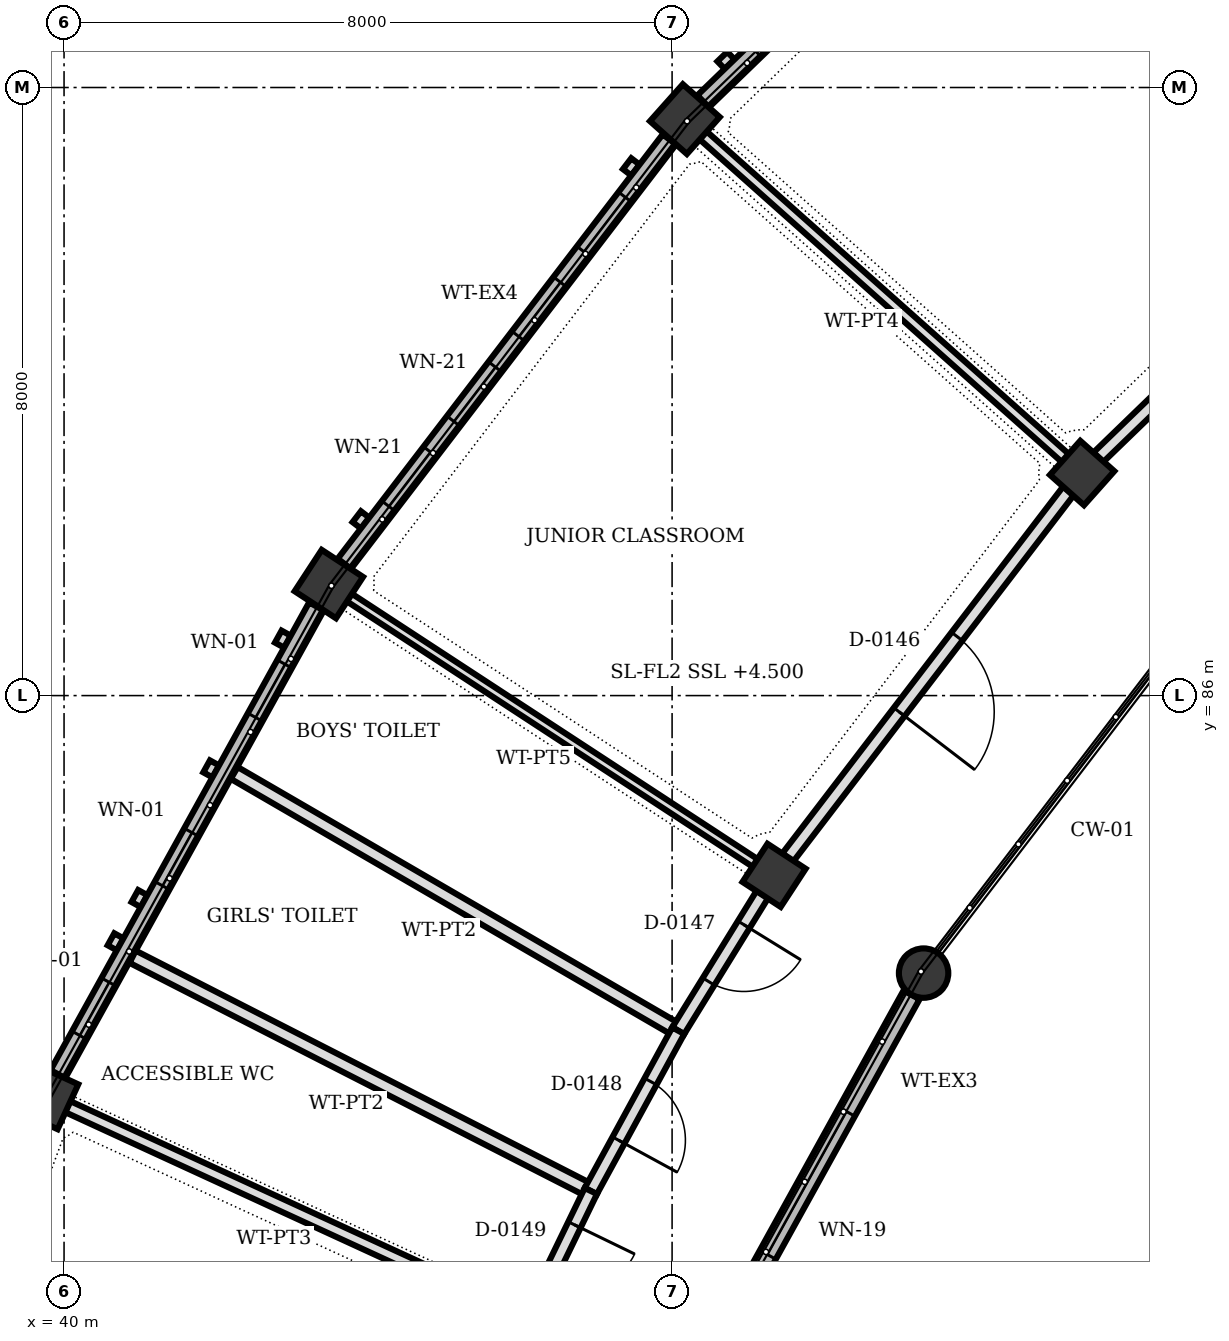
"""IFC4 building model, lengths in metres.
Left out: names, types, materials, properties, quantities, classifications, styles, units other than length and angle.
Written with IfcOpenShell. Run it as: python <this file> out.ifc"""

import sys

from ifc_helpers import new_model, si_unit, direction, frame, frame_2d, origin, origin_2d, place, context, subcontext, project, spatial, rectangle, circle, extrude, element, fill, save


model = new_model("IFC4")
c1 = context("Model", 3, precision=1e-05, world=origin(), true_north=direction((0.0, 1.0)))
c2 = subcontext(c1, "Body", "Model", "MODEL_VIEW")
j1 = project(units=[si_unit("LENGTHUNIT", "METRE"), si_unit("PLANEANGLEUNIT", "RADIAN")], contexts=[c1])
p1 = place(None, origin())
s1 = spatial("IfcSite", under=j1, at=p1, CompositionType="ELEMENT")
p2 = place(p1, origin())
s2 = spatial("IfcBuilding", under=s1, at=p2, CompositionType="ELEMENT")
p3 = place(p2, frame((0.0, 0.0, 4.5)))
s3 = spatial("IfcBuildingStorey", under=s2, at=p3, CompositionType="ELEMENT", Elevation=4.5)
p4 = place(p3, frame((51.309, 82.349, 0.0), z_axis=(0.0, 0.0, 1.0), x_axis=(1.0, 0.0, 0.0)))
e1 = element("IfcColumn", 1, at=p4, inside=s3, PredefinedType="COLUMN", context=c2, shape_type="SweptSolid", body=[
    extrude(circle(Radius=0.325, at=origin_2d()), origin(), (0.0, 0.0, 1.0), 5.12),
])
for number, where, z_axis, x_axis in (
    (2, (53.395, 88.928, 0.0), (0.0, 0.0, 1.0), (-0.747, 0.665, 0.0)),
    (3, (49.342, 83.635, 0.0), (0.0, 0.0, 1.0), (-0.837, 0.547, 0.0)),
):
    element("IfcColumn", number, at=place(p3, frame(where, z_axis=z_axis, x_axis=x_axis)), inside=s3, PredefinedType="COLUMN", context=c2, shape_type="SweptSolid", body=[
        extrude(rectangle(XDim=0.6, YDim=0.6, at=origin_2d()), origin(), (0.0, 0.0, 1.0), 4.0),
    ])
for number, where, z_axis, x_axis in (
    (4, (48.168, 93.584, 0.0), (0.0, 0.0, 1.0), (-0.747, 0.665, 0.0)),
    (5, (43.484, 87.467, 0.0), (0.0, 0.0, 1.0), (-0.837, 0.547, 0.0)),
    (6, (39.756, 80.726, 0.0), (0.0, 0.0, 1.0), (-0.909, 0.418, 0.0)),
):
    element("IfcColumn", number, at=place(p3, frame(where, z_axis=z_axis, x_axis=x_axis)), inside=s3, PredefinedType="COLUMN", context=c2, shape_type="SweptSolid", body=[
        extrude(rectangle(XDim=0.65, YDim=0.65, at=origin_2d()), origin(), (0.0, 0.0, 1.0), 4.0),
    ])
p5 = place(p3, frame((48.409, 93.818, 0.0), z_axis=(0.0, 0.0, 1.0), x_axis=(0.718677705088, 0.695343336927, 0.0)))
e7 = element("IfcWall", 7, at=p5, inside=s3, PredefinedType="SOLIDWALL", context=c2, shape_type="SweptSolid", body=[
    extrude(rectangle(XDim=7.031, YDim=0.22, at=frame_2d((3.516, 0.0))), origin(), (0.0, 0.0, 1.0), 3.172),
])
p6 = place(p5, frame((0.956, 0.0, 0.85)))
e8 = element("IfcOpeningElement", 8, at=p6, cuts=e7, PredefinedType="OPENING", context=c2, shape_type="SweptSolid", body=[
    extrude(rectangle(XDim=0.9, YDim=1.4, at=frame_2d((0.45, 0.7))), frame((0.0, 0.12, 0.0), z_axis=(0.0, -1.0, 0.0), x_axis=(1.0, 0.0, 0.0)), (0.0, 0.0, 1.0), 0.24),
])
p7 = place(p5, frame((2.362, 0.0, 0.85)))
e9 = element("IfcOpeningElement", 9, at=p7, cuts=e7, PredefinedType="OPENING", context=c2, shape_type="SweptSolid", body=[
    extrude(rectangle(XDim=0.9, YDim=1.4, at=frame_2d((0.45, 0.7))), frame((0.0, 0.12, 0.0), z_axis=(0.0, -1.0, 0.0), x_axis=(1.0, 0.0, 0.0)), (0.0, 0.0, 1.0), 0.24),
])
p8 = place(p5, frame((3.769, 0.0, 0.85)))
e10 = element("IfcOpeningElement", 10, at=p8, cuts=e7, PredefinedType="OPENING", context=c2, shape_type="SweptSolid", body=[
    extrude(rectangle(XDim=0.9, YDim=1.4, at=frame_2d((0.45, 0.7))), frame((0.0, 0.12, 0.0), z_axis=(0.0, -1.0, 0.0), x_axis=(1.0, 0.0, 0.0)), (0.0, 0.0, 1.0), 0.24),
])
p9 = place(p5, frame((5.175, 0.0, 0.85)))
e11 = element("IfcOpeningElement", 11, at=p9, cuts=e7, PredefinedType="OPENING", context=c2, shape_type="SweptSolid", body=[
    extrude(rectangle(XDim=0.9, YDim=1.4, at=frame_2d((0.45, 0.7))), frame((0.0, 0.12, 0.0), z_axis=(0.0, -1.0, 0.0), x_axis=(1.0, 0.0, 0.0)), (0.0, 0.0, 1.0), 0.24),
])
p10 = place(p3, frame((43.688, 87.734, 0.0), z_axis=(0.0, 0.0, 1.0), x_axis=(0.60805685998, 0.793893478391, 0.0)))
e12 = element("IfcWall", 12, at=p10, inside=s3, PredefinedType="SOLIDWALL", context=c2, shape_type="SweptSolid", body=[
    extrude(rectangle(XDim=7.032, YDim=0.22, at=frame_2d((3.516, 0.0))), origin(), (0.0, 0.0, 1.0), 3.172),
])
p11 = place(p10, frame((0.956, 0.0, 0.85)))
e13 = element("IfcOpeningElement", 13, at=p11, cuts=e12, PredefinedType="OPENING", context=c2, shape_type="SweptSolid", body=[
    extrude(rectangle(XDim=0.9, YDim=1.4, at=frame_2d((0.45, 0.7))), frame((0.0, 0.12, 0.0), z_axis=(0.0, -1.0, 0.0), x_axis=(1.0, 0.0, 0.0)), (0.0, 0.0, 1.0), 0.24),
])
p12 = place(p10, frame((2.363, 0.0, 0.85)))
e14 = element("IfcOpeningElement", 14, at=p12, cuts=e12, PredefinedType="OPENING", context=c2, shape_type="SweptSolid", body=[
    extrude(rectangle(XDim=0.9, YDim=1.4, at=frame_2d((0.45, 0.7))), frame((0.0, 0.12, 0.0), z_axis=(0.0, -1.0, 0.0), x_axis=(1.0, 0.0, 0.0)), (0.0, 0.0, 1.0), 0.24),
])
p13 = place(p10, frame((3.769, 0.0, 0.85)))
e15 = element("IfcOpeningElement", 15, at=p13, cuts=e12, PredefinedType="OPENING", context=c2, shape_type="SweptSolid", body=[
    extrude(rectangle(XDim=0.9, YDim=1.4, at=frame_2d((0.45, 0.7))), frame((0.0, 0.12, 0.0), z_axis=(0.0, -1.0, 0.0), x_axis=(1.0, 0.0, 0.0)), (0.0, 0.0, 1.0), 0.24),
])
p14 = place(p10, frame((5.176, 0.0, 0.85)))
e16 = element("IfcOpeningElement", 16, at=p14, cuts=e12, PredefinedType="OPENING", context=c2, shape_type="SweptSolid", body=[
    extrude(rectangle(XDim=0.9, YDim=1.4, at=frame_2d((0.45, 0.7))), frame((0.0, 0.12, 0.0), z_axis=(0.0, -1.0, 0.0), x_axis=(1.0, 0.0, 0.0)), (0.0, 0.0, 1.0), 0.24),
])
p15 = place(p3, frame((39.919, 81.02, 0.0), z_axis=(0.0, 0.0, 1.0), x_axis=(0.483873000068, 0.87513822897, 0.0)))
e17 = element("IfcWall", 17, at=p15, inside=s3, PredefinedType="SOLIDWALL", context=c2, shape_type="SweptSolid", body=[
    extrude(rectangle(XDim=7.031, YDim=0.22, at=frame_2d((3.516, 0.0))), origin(), (0.0, 0.0, 1.0), 3.172),
])
p16 = place(p15, frame((0.584, 0.0, 1.15)))
e18 = element("IfcOpeningElement", 18, at=p16, cuts=e17, PredefinedType="OPENING", context=c2, shape_type="SweptSolid", body=[
    extrude(rectangle(XDim=0.8, YDim=1.1, at=frame_2d((0.4, 0.55))), frame((0.0, 0.12, 0.0), z_axis=(0.0, -1.0, 0.0), x_axis=(1.0, 0.0, 0.0)), (0.0, 0.0, 1.0), 0.24),
])
p17 = place(p15, frame((2.834, 0.0, 1.15)))
e19 = element("IfcOpeningElement", 19, at=p17, cuts=e17, PredefinedType="OPENING", context=c2, shape_type="SweptSolid", body=[
    extrude(rectangle(XDim=0.8, YDim=1.1, at=frame_2d((0.4, 0.55))), frame((0.0, 0.12, 0.0), z_axis=(0.0, -1.0, 0.0), x_axis=(1.0, 0.0, 0.0)), (0.0, 0.0, 1.0), 0.24),
])
p18 = place(p15, frame((5.365, 0.0, 1.15)))
e20 = element("IfcOpeningElement", 20, at=p18, cuts=e17, PredefinedType="OPENING", context=c2, shape_type="SweptSolid", body=[
    extrude(rectangle(XDim=0.8, YDim=1.1, at=frame_2d((0.4, 0.55))), frame((0.0, 0.12, 0.0), z_axis=(0.0, -1.0, 0.0), x_axis=(1.0, 0.0, 0.0)), (0.0, 0.0, 1.0), 0.24),
])
p19 = place(p3, frame((51.151, 82.063, 0.0), z_axis=(0.0, 0.0, 1.0), x_axis=(-0.483955379171, -0.875092675647, 0.0)))
e21 = element("IfcWall", 21, at=p19, inside=s3, PredefinedType="SOLIDWALL", context=c2, shape_type="SweptSolid", body=[
    extrude(rectangle(XDim=5.666, YDim=0.24, at=frame_2d((2.833, 0.0))), origin(), (0.0, 0.0, 1.0), 3.55),
])
p20 = place(p19, frame((1.758, 0.0, 0.9)))
e22 = element("IfcOpeningElement", 22, at=p20, cuts=e21, PredefinedType="OPENING", context=c2, shape_type="SweptSolid", body=[
    extrude(rectangle(XDim=2.15, YDim=1.25, at=frame_2d((1.075, 0.625))), frame((0.0, 0.13, 0.0), z_axis=(0.0, -1.0, 0.0), x_axis=(1.0, 0.0, 0.0)), (0.0, 0.0, 1.0), 0.26),
])
p21 = place(p3, frame((53.177, 89.122, 0.0), z_axis=(0.0, 0.0, 1.0), x_axis=(-0.746692270919, 0.665169641934, 0.0)))
e23 = element("IfcWall", 23, at=p21, inside=s3, PredefinedType="PARTITIONING", context=c2, shape_type="SweptSolid", body=[
    extrude(rectangle(XDim=6.391, YDim=0.14, at=frame_2d((3.195, 0.0))), origin(), (0.0, 0.0, 1.0), 3.072),
])
p22 = place(p3, frame((49.098, 83.795, 0.0), z_axis=(0.0, 0.0, 1.0), x_axis=(-0.836919139192, 0.547326551935, 0.0)))
e24 = element("IfcWall", 24, at=p22, inside=s3, PredefinedType="PARTITIONING", context=c2, shape_type="SweptSolid", body=[
    extrude(rectangle(XDim=6.391, YDim=0.12, at=frame_2d((3.196, 0.0))), origin(), (0.0, 0.0, 1.0), 3.072),
])
p23 = place(p3, frame((45.851, 77.923, 0.0), z_axis=(0.0, 0.0, 1.0), x_axis=(-0.908513073448, 0.41785642914, 0.0)))
e25 = element("IfcWall", 25, at=p23, inside=s3, PredefinedType="PARTITIONING", context=c2, shape_type="SweptSolid", body=[
    extrude(rectangle(XDim=6.392, YDim=0.16, at=frame_2d((3.196, 0.0))), origin(), (0.0, 0.0, 1.0), 3.072),
])
p24 = place(p3, frame((48.081, 81.591, 0.0), z_axis=(0.0, 0.0, 1.0), x_axis=(-0.864871459639, 0.501993384719, 0.0)))
e26 = element("IfcWall", 26, at=p24, inside=s3, PredefinedType="PARTITIONING", context=c2, shape_type="SweptSolid", body=[
    extrude(rectangle(XDim=6.755, YDim=0.18, at=frame_2d((3.377, 0.0))), origin(), (0.0, 0.0, 1.0), 3.072),
])
p25 = place(p3, frame((46.931, 79.482, 0.0), z_axis=(0.0, 0.0, 1.0), x_axis=(-0.890396362977, 0.455186024387, 0.0)))
e27 = element("IfcWall", 27, at=p25, inside=s3, PredefinedType="PARTITIONING", context=c2, shape_type="SweptSolid", body=[
    extrude(rectangle(XDim=6.771, YDim=0.18, at=frame_2d((3.385, 0.0))), origin(), (0.0, 0.0, 1.0), 3.072),
])
p26 = place(p3, frame((57.975, 93.361, 0.0), z_axis=(0.0, 0.0, 1.0), x_axis=(-0.7186137907, -0.695409390084, 0.0)))
e28 = element("IfcWall", 28, at=p26, inside=s3, PredefinedType="PARTITIONING", context=c2, shape_type="SweptSolid", body=[
    extrude(rectangle(XDim=6.081, YDim=0.18, at=frame_2d((3.041, 0.0))), origin(), (0.0, 0.0, 1.0), 3.072),
])
p27 = place(p26, frame((2.551, 0.0, 0.0)))
e29 = element("IfcOpeningElement", 29, at=p27, cuts=e28, PredefinedType="OPENING", context=c2, shape_type="SweptSolid", body=[
    extrude(rectangle(XDim=0.98, YDim=2.2, at=frame_2d((0.49, 1.1))), frame((0.0, 0.1, 0.0), z_axis=(0.0, -1.0, 0.0), x_axis=(1.0, 0.0, 0.0)), (0.0, 0.0, 1.0), 0.2),
])
p28 = place(p3, frame((53.217, 88.696, 0.0), z_axis=(0.0, 0.0, 1.0), x_axis=(-0.607883612756, -0.794026141473, 0.0)))
e30 = element("IfcWall", 30, at=p28, inside=s3, PredefinedType="PARTITIONING", context=c2, shape_type="SweptSolid", body=[
    extrude(rectangle(XDim=6.082, YDim=0.18, at=frame_2d((3.041, 0.0))), origin(), (0.0, 0.0, 1.0), 3.072),
])
p29 = place(p28, frame((2.416, 0.0, 0.0)))
e31 = element("IfcOpeningElement", 31, at=p29, cuts=e30, PredefinedType="OPENING", context=c2, shape_type="SweptSolid", body=[
    extrude(rectangle(XDim=1.25, YDim=2.2, at=frame_2d((0.625, 1.1))), frame((0.0, 0.1, 0.0), z_axis=(0.0, -1.0, 0.0), x_axis=(1.0, 0.0, 0.0)), (0.0, 0.0, 1.0), 0.2),
])
p30 = place(p3, frame((49.189, 83.386, 0.0), z_axis=(0.0, 0.0, 1.0), x_axis=(-0.525246440568, -0.850950161097, 0.0)))
e32 = element("IfcWall", 32, at=p30, inside=s3, PredefinedType="PARTITIONING", context=c2, shape_type="SweptSolid", body=[
    extrude(rectangle(XDim=2.109, YDim=0.18, at=frame_2d((1.055, 0.0))), origin(), (0.0, 0.0, 1.0), 3.072),
])
p31 = place(p30, frame((0.469, 0.0, 0.0)))
e33 = element("IfcOpeningElement", 33, at=p31, cuts=e32, PredefinedType="OPENING", context=c2, shape_type="SweptSolid", body=[
    extrude(rectangle(XDim=0.88, YDim=2.1, at=frame_2d((0.44, 1.05))), frame((0.0, 0.1, 0.0), z_axis=(0.0, -1.0, 0.0), x_axis=(1.0, 0.0, 0.0)), (0.0, 0.0, 1.0), 0.2),
])
p32 = place(p3, frame((48.081, 81.591, 0.0), z_axis=(0.0, 0.0, 1.0), x_axis=(-0.478759564311, -0.87794605733, 0.0)))
e34 = element("IfcWall", 34, at=p32, inside=s3, PredefinedType="PARTITIONING", context=c2, shape_type="SweptSolid", body=[
    extrude(rectangle(XDim=2.402, YDim=0.18, at=frame_2d((1.201, 0.0))), origin(), (0.0, 0.0, 1.0), 3.072),
])
p33 = place(p32, frame((0.761, 0.0, 0.0)))
e35 = element("IfcOpeningElement", 35, at=p33, cuts=e34, PredefinedType="OPENING", context=c2, shape_type="SweptSolid", body=[
    extrude(rectangle(XDim=0.88, YDim=2.1, at=frame_2d((0.44, 1.05))), frame((0.0, 0.1, 0.0), z_axis=(0.0, -1.0, 0.0), x_axis=(1.0, 0.0, 0.0)), (0.0, 0.0, 1.0), 0.2),
])
p34 = place(p3, frame((46.931, 79.482, 0.0), z_axis=(0.0, 0.0, 1.0), x_axis=(-0.436524333187, -0.899692451083, 0.0)))
e36 = element("IfcWall", 36, at=p34, inside=s3, PredefinedType="PARTITIONING", context=c2, shape_type="SweptSolid", body=[
    extrude(rectangle(XDim=1.576, YDim=0.18, at=frame_2d((0.788, 0.0))), origin(), (0.0, 0.0, 1.0), 3.072),
])
p35 = place(p34, frame((0.494, 0.0, 0.0)))
e37 = element("IfcOpeningElement", 37, at=p35, cuts=e36, PredefinedType="OPENING", context=c2, shape_type="SweptSolid", body=[
    extrude(rectangle(XDim=0.88, YDim=2.1, at=frame_2d((0.44, 1.05))), frame((0.0, 0.1, 0.0), z_axis=(0.0, -1.0, 0.0), x_axis=(1.0, 0.0, 0.0)), (0.0, 0.0, 1.0), 0.2),
])
p36 = place(p11, origin())
e38 = element("IfcWindow", 38, at=p36, inside=s3, PartitioningType="SINGLE_PANEL", PredefinedType="WINDOW", context=c2, shape_type="SweptSolid", body=[
    extrude(rectangle(XDim=0.9, YDim=1.4, at=frame_2d((0.45, 0.7))), frame((0.0, 0.03, 0.0), z_axis=(0.0, -1.0, 0.0), x_axis=(1.0, 0.0, 0.0)), (0.0, 0.0, 1.0), 0.06),
])
fill(e13, e38)
p37 = place(p12, origin())
e39 = element("IfcWindow", 39, at=p37, inside=s3, PartitioningType="SINGLE_PANEL", PredefinedType="WINDOW", context=c2, shape_type="SweptSolid", body=[
    extrude(rectangle(XDim=0.9, YDim=1.4, at=frame_2d((0.45, 0.7))), frame((0.0, 0.03, 0.0), z_axis=(0.0, -1.0, 0.0), x_axis=(1.0, 0.0, 0.0)), (0.0, 0.0, 1.0), 0.06),
])
fill(e14, e39)
p38 = place(p13, origin())
e40 = element("IfcWindow", 40, at=p38, inside=s3, PartitioningType="SINGLE_PANEL", PredefinedType="WINDOW", context=c2, shape_type="SweptSolid", body=[
    extrude(rectangle(XDim=0.9, YDim=1.4, at=frame_2d((0.45, 0.7))), frame((0.0, 0.03, 0.0), z_axis=(0.0, -1.0, 0.0), x_axis=(1.0, 0.0, 0.0)), (0.0, 0.0, 1.0), 0.06),
])
fill(e15, e40)
p39 = place(p14, origin())
e41 = element("IfcWindow", 41, at=p39, inside=s3, PartitioningType="SINGLE_PANEL", PredefinedType="WINDOW", context=c2, shape_type="SweptSolid", body=[
    extrude(rectangle(XDim=0.9, YDim=1.4, at=frame_2d((0.45, 0.7))), frame((0.0, 0.03, 0.0), z_axis=(0.0, -1.0, 0.0), x_axis=(1.0, 0.0, 0.0)), (0.0, 0.0, 1.0), 0.06),
])
fill(e16, e41)
p40 = place(p16, origin())
e42 = element("IfcWindow", 42, at=p40, inside=s3, PartitioningType="SINGLE_PANEL", PredefinedType="WINDOW", context=c2, shape_type="SweptSolid", body=[
    extrude(rectangle(XDim=0.8, YDim=1.1, at=frame_2d((0.4, 0.55))), frame((0.0, 0.03, 0.0), z_axis=(0.0, -1.0, 0.0), x_axis=(1.0, 0.0, 0.0)), (0.0, 0.0, 1.0), 0.06),
])
fill(e18, e42)
p41 = place(p17, origin())
e43 = element("IfcWindow", 43, at=p41, inside=s3, PartitioningType="SINGLE_PANEL", PredefinedType="WINDOW", context=c2, shape_type="SweptSolid", body=[
    extrude(rectangle(XDim=0.8, YDim=1.1, at=frame_2d((0.4, 0.55))), frame((0.0, 0.03, 0.0), z_axis=(0.0, -1.0, 0.0), x_axis=(1.0, 0.0, 0.0)), (0.0, 0.0, 1.0), 0.06),
])
fill(e19, e43)
p42 = place(p18, origin())
e44 = element("IfcWindow", 44, at=p42, inside=s3, PartitioningType="SINGLE_PANEL", PredefinedType="WINDOW", context=c2, shape_type="SweptSolid", body=[
    extrude(rectangle(XDim=0.8, YDim=1.1, at=frame_2d((0.4, 0.55))), frame((0.0, 0.03, 0.0), z_axis=(0.0, -1.0, 0.0), x_axis=(1.0, 0.0, 0.0)), (0.0, 0.0, 1.0), 0.06),
])
fill(e20, e44)
p43 = place(p20, origin())
e45 = element("IfcWindow", 45, at=p43, inside=s3, PartitioningType="SINGLE_PANEL", PredefinedType="WINDOW", context=c2, shape_type="SweptSolid", body=[
    extrude(rectangle(XDim=2.15, YDim=1.25, at=frame_2d((1.075, 0.625))), frame((0.0, 0.03, 0.0), z_axis=(0.0, -1.0, 0.0), x_axis=(1.0, 0.0, 0.0)), (0.0, 0.0, 1.0), 0.06),
])
fill(e22, e45)
p44 = place(p29, origin())
e46 = element("IfcDoor", 46, at=p44, inside=s3, OperationType="SINGLE_SWING_RIGHT", PredefinedType="DOOR", context=c2, shape_type="SweptSolid", body=[
    extrude(rectangle(XDim=1.25, YDim=2.2, at=frame_2d((0.625, 1.1))), frame((0.0, 0.025, 0.0), z_axis=(0.0, -1.0, 0.0), x_axis=(1.0, 0.0, 0.0)), (0.0, 0.0, 1.0), 0.05),
])
fill(e31, e46)
p45 = place(p31, origin())
e47 = element("IfcDoor", 47, at=p45, inside=s3, OperationType="SINGLE_SWING_LEFT", PredefinedType="DOOR", context=c2, shape_type="SweptSolid", body=[
    extrude(rectangle(XDim=0.88, YDim=2.1, at=frame_2d((0.44, 1.05))), frame((0.0, 0.025, 0.0), z_axis=(0.0, -1.0, 0.0), x_axis=(1.0, 0.0, 0.0)), (0.0, 0.0, 1.0), 0.05),
])
fill(e33, e47)
p46 = place(p33, origin())
e48 = element("IfcDoor", 48, at=p46, inside=s3, OperationType="SINGLE_SWING_RIGHT", PredefinedType="DOOR", context=c2, shape_type="SweptSolid", body=[
    extrude(rectangle(XDim=0.88, YDim=2.1, at=frame_2d((0.44, 1.05))), frame((0.0, 0.025, 0.0), z_axis=(0.0, -1.0, 0.0), x_axis=(1.0, 0.0, 0.0)), (0.0, 0.0, 1.0), 0.05),
])
fill(e35, e48)
p47 = place(p35, origin())
e49 = element("IfcDoor", 49, at=p47, inside=s3, OperationType="SINGLE_SWING_LEFT", PredefinedType="DOOR", context=c2, shape_type="SweptSolid", body=[
    extrude(rectangle(XDim=0.88, YDim=2.1, at=frame_2d((0.44, 1.05))), frame((0.0, 0.025, 0.0), z_axis=(0.0, -1.0, 0.0), x_axis=(1.0, 0.0, 0.0)), (0.0, 0.0, 1.0), 0.05),
])
fill(e37, e49)
save(model, sys.argv[1])
